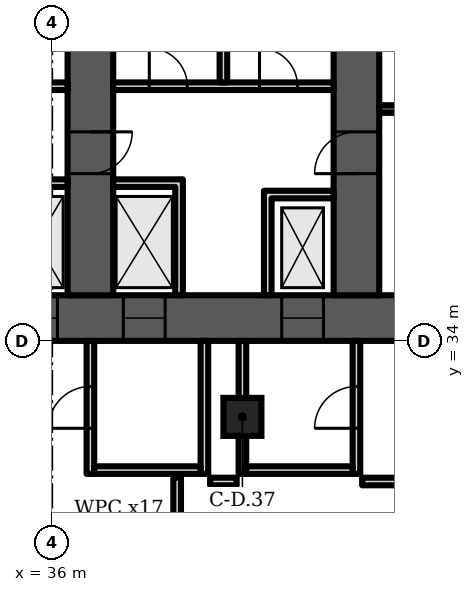
"""IFC4 building model, lengths in metres.
Left out: names, types, materials, properties, quantities, classifications, styles, units other than length and angle.
Written with IfcOpenShell. Run it as: python <this file> out.ifc"""

import sys

from ifc_helpers import new_model, si_unit, direction, frame, frame_2d, origin, origin_2d, place, context, subcontext, project, spatial, polyline, rectangle, outline, extrude, element, fill, save


model = new_model("IFC4")
c1 = context("Model", 3, precision=1e-05, world=origin(), true_north=direction((0.0, 1.0)))
c2 = subcontext(c1, "Body", "Model", "MODEL_VIEW")
j1 = project(units=[si_unit("LENGTHUNIT", "METRE"), si_unit("PLANEANGLEUNIT", "RADIAN")], contexts=[c1])
p1 = place(None, origin())
s1 = spatial("IfcSite", under=j1, at=p1, CompositionType="ELEMENT")
p2 = place(p1, origin())
s2 = spatial("IfcBuilding", under=s1, at=p2, CompositionType="ELEMENT")
p3 = place(p2, frame((0.0, 0.0, 33.0)))
s3 = spatial("IfcBuildingStorey", under=s2, at=p3, CompositionType="ELEMENT", Elevation=33.0)
p4 = place(p3, frame((41.0, 32.0, 0.0), z_axis=(0.0, 0.0, 1.0), x_axis=(1.0, 0.0, 0.0)))
e1 = element("IfcColumn", 1, at=p4, inside=s3, PredefinedType="COLUMN", context=c2, shape_type="SweptSolid", body=[
    extrude(rectangle(XDim=1.0, YDim=1.0, at=origin_2d()), origin(), (0.0, 0.0, 1.0), 8.5),
])
p5 = place(p3, frame((9.0, 34.6, 0.0), z_axis=(0.0, 0.0, 1.0), x_axis=(1.0, 0.0, 0.0)))
e2 = element("IfcWall", 2, at=p5, inside=s3, PredefinedType="SHEAR", context=c2, shape_type="SweptSolid", body=[
    extrude(rectangle(XDim=56.0, YDim=1.2, at=frame_2d((28.0, 0.0))), origin(), (0.0, 0.0, 1.0), 8.1),
])
p6 = place(p5, frame((2.0, 0.0, 0.0)))
e3 = element("IfcOpeningElement", 3, at=p6, cuts=e2, PredefinedType="OPENING", context=c2, shape_type="SweptSolid", body=[
    extrude(rectangle(XDim=1.0, YDim=2.1, at=frame_2d((0.5, 1.05))), frame((0.0, 0.61, 0.0), z_axis=(0.0, -1.0, 0.0), x_axis=(1.0, 0.0, 0.0)), (0.0, 0.0, 1.0), 1.22),
])
p7 = place(p5, frame((4.6, 0.0, 0.0)))
e4 = element("IfcOpeningElement", 4, at=p7, cuts=e2, PredefinedType="OPENING", context=c2, shape_type="SweptSolid", body=[
    extrude(rectangle(XDim=1.0, YDim=2.1, at=frame_2d((0.5, 1.05))), frame((0.0, 0.61, 0.0), z_axis=(0.0, -1.0, 0.0), x_axis=(1.0, 0.0, 0.0)), (0.0, 0.0, 1.0), 1.22),
])
p8 = place(p5, frame((7.867, 0.0, 0.0)))
e5 = element("IfcOpeningElement", 5, at=p8, cuts=e2, PredefinedType="OPENING", context=c2, shape_type="SweptSolid", body=[
    extrude(rectangle(XDim=1.1, YDim=2.1, at=frame_2d((0.55, 1.05))), frame((0.0, 0.61, 0.0), z_axis=(0.0, -1.0, 0.0), x_axis=(1.0, 0.0, 0.0)), (0.0, 0.0, 1.0), 1.22),
])
p9 = place(p5, frame((12.033, 0.0, 0.0)))
e6 = element("IfcOpeningElement", 6, at=p9, cuts=e2, PredefinedType="OPENING", context=c2, shape_type="SweptSolid", body=[
    extrude(rectangle(XDim=1.1, YDim=2.1, at=frame_2d((0.55, 1.05))), frame((0.0, 0.61, 0.0), z_axis=(0.0, -1.0, 0.0), x_axis=(1.0, 0.0, 0.0)), (0.0, 0.0, 1.0), 1.22),
])
p10 = place(p5, frame((9.8, 0.0, 0.0)))
e7 = element("IfcOpeningElement", 7, at=p10, cuts=e2, PredefinedType="OPENING", context=c2, shape_type="SweptSolid", body=[
    extrude(rectangle(XDim=1.4, YDim=2.1, at=frame_2d((0.7, 1.05))), frame((0.0, 0.61, 0.0), z_axis=(0.0, -1.0, 0.0), x_axis=(1.0, 0.0, 0.0)), (0.0, 0.0, 1.0), 1.22),
])
p11 = place(p5, frame((14.65, 0.0, 0.0)))
e8 = element("IfcOpeningElement", 8, at=p11, cuts=e2, PredefinedType="OPENING", context=c2, shape_type="SweptSolid", body=[
    extrude(rectangle(XDim=1.2, YDim=2.1, at=frame_2d((0.6, 1.05))), frame((0.0, 0.61, 0.0), z_axis=(0.0, -1.0, 0.0), x_axis=(1.0, 0.0, 0.0)), (0.0, 0.0, 1.0), 1.22),
])
p12 = place(p5, frame((21.867, 0.0, 0.0)))
e9 = element("IfcOpeningElement", 9, at=p12, cuts=e2, PredefinedType="OPENING", context=c2, shape_type="SweptSolid", body=[
    extrude(rectangle(XDim=1.1, YDim=2.1, at=frame_2d((0.55, 1.05))), frame((0.0, 0.61, 0.0), z_axis=(0.0, -1.0, 0.0), x_axis=(1.0, 0.0, 0.0)), (0.0, 0.0, 1.0), 1.22),
])
p13 = place(p5, frame((26.033, 0.0, 0.0)))
e10 = element("IfcOpeningElement", 10, at=p13, cuts=e2, PredefinedType="OPENING", context=c2, shape_type="SweptSolid", body=[
    extrude(rectangle(XDim=1.1, YDim=2.1, at=frame_2d((0.55, 1.05))), frame((0.0, 0.61, 0.0), z_axis=(0.0, -1.0, 0.0), x_axis=(1.0, 0.0, 0.0)), (0.0, 0.0, 1.0), 1.22),
])
p14 = place(p5, frame((23.8, 0.0, 0.0)))
e11 = element("IfcOpeningElement", 11, at=p14, cuts=e2, PredefinedType="OPENING", context=c2, shape_type="SweptSolid", body=[
    extrude(rectangle(XDim=1.4, YDim=2.1, at=frame_2d((0.7, 1.05))), frame((0.0, 0.61, 0.0), z_axis=(0.0, -1.0, 0.0), x_axis=(1.0, 0.0, 0.0)), (0.0, 0.0, 1.0), 1.22),
])
p15 = place(p5, frame((28.867, 0.0, 0.0)))
e12 = element("IfcOpeningElement", 12, at=p15, cuts=e2, PredefinedType="OPENING", context=c2, shape_type="SweptSolid", body=[
    extrude(rectangle(XDim=1.1, YDim=2.1, at=frame_2d((0.55, 1.05))), frame((0.0, 0.61, 0.0), z_axis=(0.0, -1.0, 0.0), x_axis=(1.0, 0.0, 0.0)), (0.0, 0.0, 1.0), 1.22),
])
p16 = place(p5, frame((33.033, 0.0, 0.0)))
e13 = element("IfcOpeningElement", 13, at=p16, cuts=e2, PredefinedType="OPENING", context=c2, shape_type="SweptSolid", body=[
    extrude(rectangle(XDim=1.1, YDim=2.1, at=frame_2d((0.55, 1.05))), frame((0.0, 0.61, 0.0), z_axis=(0.0, -1.0, 0.0), x_axis=(1.0, 0.0, 0.0)), (0.0, 0.0, 1.0), 1.22),
])
p17 = place(p5, frame((40.15, 0.0, 0.0)))
e14 = element("IfcOpeningElement", 14, at=p17, cuts=e2, PredefinedType="OPENING", context=c2, shape_type="SweptSolid", body=[
    extrude(rectangle(XDim=1.2, YDim=2.1, at=frame_2d((0.6, 1.05))), frame((0.0, 0.61, 0.0), z_axis=(0.0, -1.0, 0.0), x_axis=(1.0, 0.0, 0.0)), (0.0, 0.0, 1.0), 1.22),
])
p18 = place(p5, frame((44.8, 0.0, 0.0)))
e15 = element("IfcOpeningElement", 15, at=p18, cuts=e2, PredefinedType="OPENING", context=c2, shape_type="SweptSolid", body=[
    extrude(rectangle(XDim=1.4, YDim=2.1, at=frame_2d((0.7, 1.05))), frame((0.0, 0.61, 0.0), z_axis=(0.0, -1.0, 0.0), x_axis=(1.0, 0.0, 0.0)), (0.0, 0.0, 1.0), 1.22),
])
p19 = place(p5, frame((49.867, 0.0, 0.0)))
e16 = element("IfcOpeningElement", 16, at=p19, cuts=e2, PredefinedType="OPENING", context=c2, shape_type="SweptSolid", body=[
    extrude(rectangle(XDim=1.1, YDim=2.1, at=frame_2d((0.55, 1.05))), frame((0.0, 0.61, 0.0), z_axis=(0.0, -1.0, 0.0), x_axis=(1.0, 0.0, 0.0)), (0.0, 0.0, 1.0), 1.22),
])
p20 = place(p5, frame((53.5, 0.0, 0.0)))
e17 = element("IfcOpeningElement", 17, at=p20, cuts=e2, PredefinedType="OPENING", context=c2, shape_type="SweptSolid", body=[
    extrude(rectangle(XDim=1.1, YDim=2.1, at=frame_2d((0.55, 1.05))), frame((0.0, 0.61, 0.0), z_axis=(0.0, -1.0, 0.0), x_axis=(1.0, 0.0, 0.0)), (0.0, 0.0, 1.0), 1.22),
])
p21 = place(p5, frame((51.567, 0.0, 0.0)))
e18 = element("IfcOpeningElement", 18, at=p21, cuts=e2, PredefinedType="OPENING", context=c2, shape_type="SweptSolid", body=[
    extrude(rectangle(XDim=1.4, YDim=2.1, at=frame_2d((0.7, 1.05))), frame((0.0, 0.61, 0.0), z_axis=(0.0, -1.0, 0.0), x_axis=(1.0, 0.0, 0.0)), (0.0, 0.0, 1.0), 1.22),
])
p22 = place(p3, frame((37.0, 35.2, 0.0), z_axis=(0.0, 0.0, 1.0), x_axis=(0.0, 1.0, 0.0)))
e19 = element("IfcWall", 19, at=p22, inside=s3, PredefinedType="SHEAR", context=c2, shape_type="SweptSolid", body=[
    extrude(rectangle(XDim=12.8, YDim=1.2, at=frame_2d((6.4, 0.0))), origin(), (0.0, 0.0, 1.0), 8.1),
])
p23 = place(p22, frame((3.2, 0.0, 0.0)))
e20 = element("IfcOpeningElement", 20, at=p23, cuts=e19, PredefinedType="OPENING", context=c2, shape_type="SweptSolid", body=[
    extrude(rectangle(XDim=1.1, YDim=2.1, at=frame_2d((0.55, 1.05))), frame((0.0, 0.61, 0.0), z_axis=(0.0, -1.0, 0.0), x_axis=(1.0, 0.0, 0.0)), (0.0, 0.0, 1.0), 1.22),
])
p24 = place(p22, frame((9.6, 0.0, 0.0)))
e21 = element("IfcOpeningElement", 21, at=p24, cuts=e19, PredefinedType="OPENING", context=c2, shape_type="SweptSolid", body=[
    extrude(rectangle(XDim=1.0, YDim=2.1, at=frame_2d((0.5, 1.05))), frame((0.0, 0.61, 0.0), z_axis=(0.0, -1.0, 0.0), x_axis=(1.0, 0.0, 0.0)), (0.0, 0.0, 1.0), 1.22),
])
p25 = place(p3, frame((44.0, 35.2, 0.0), z_axis=(0.0, 0.0, 1.0), x_axis=(0.0, 1.0, 0.0)))
e22 = element("IfcWall", 22, at=p25, inside=s3, PredefinedType="SHEAR", context=c2, shape_type="SweptSolid", body=[
    extrude(rectangle(XDim=12.8, YDim=1.2, at=frame_2d((6.4, 0.0))), origin(), (0.0, 0.0, 1.0), 8.1),
])
p26 = place(p25, frame((3.2, 0.0, 0.0)))
e23 = element("IfcOpeningElement", 23, at=p26, cuts=e22, PredefinedType="OPENING", context=c2, shape_type="SweptSolid", body=[
    extrude(rectangle(XDim=1.1, YDim=2.1, at=frame_2d((0.55, 1.05))), frame((0.0, 0.61, 0.0), z_axis=(0.0, -1.0, 0.0), x_axis=(1.0, 0.0, 0.0)), (0.0, 0.0, 1.0), 1.22),
])
p27 = place(p25, frame((9.6, 0.0, 0.0)))
e24 = element("IfcOpeningElement", 24, at=p27, cuts=e22, PredefinedType="OPENING", context=c2, shape_type="SweptSolid", body=[
    extrude(rectangle(XDim=1.0, YDim=2.1, at=frame_2d((0.5, 1.05))), frame((0.0, 0.61, 0.0), z_axis=(0.0, -1.0, 0.0), x_axis=(1.0, 0.0, 0.0)), (0.0, 0.0, 1.0), 1.22),
])
p28 = place(p3, frame((30.6, 40.7, 0.0), z_axis=(0.0, 0.0, 1.0), x_axis=(1.0, 0.0, 0.0)))
e25 = element("IfcWall", 25, at=p28, inside=s3, PredefinedType="PARTITIONING", context=c2, shape_type="SweptSolid", body=[
    extrude(rectangle(XDim=5.8, YDim=0.2, at=frame_2d((2.9, 0.0))), origin(), (0.0, 0.0, 1.0), 8.1),
])
p29 = place(p28, frame((0.95, 0.0, 0.0)))
e26 = element("IfcOpeningElement", 26, at=p29, cuts=e25, PredefinedType="OPENING", context=c2, shape_type="SweptSolid", body=[
    extrude(rectangle(XDim=1.0, YDim=2.1, at=frame_2d((0.5, 1.05))), frame((0.0, 0.11, 0.0), z_axis=(0.0, -1.0, 0.0), x_axis=(1.0, 0.0, 0.0)), (0.0, 0.0, 1.0), 0.22),
])
p30 = place(p28, frame((3.85, 0.0, 0.0)))
e27 = element("IfcOpeningElement", 27, at=p30, cuts=e25, PredefinedType="OPENING", context=c2, shape_type="SweptSolid", body=[
    extrude(rectangle(XDim=1.0, YDim=2.1, at=frame_2d((0.5, 1.05))), frame((0.0, 0.11, 0.0), z_axis=(0.0, -1.0, 0.0), x_axis=(1.0, 0.0, 0.0)), (0.0, 0.0, 1.0), 0.22),
])
p31 = place(p3, origin())
e28 = element("IfcWall", 28, at=p31, inside=s3, PredefinedType="PARTITIONING", context=c2, shape_type="SweptSolid", body=[
    extrude(outline(polyline([(34.567, 38.25), (34.767, 38.25), (36.4, 38.25), (36.4, 38.05), (34.767, 38.05), (34.767, 35.2), (34.567, 35.2), (34.567, 38.25)])), origin(), (0.0, 0.0, 1.0), 8.1),
])
p32 = place(p3, frame((37.6, 40.7, 0.0), z_axis=(0.0, 0.0, 1.0), x_axis=(1.0, 0.0, 0.0)))
e29 = element("IfcWall", 29, at=p32, inside=s3, PredefinedType="PARTITIONING", context=c2, shape_type="SweptSolid", body=[
    extrude(rectangle(XDim=5.8, YDim=0.2, at=frame_2d((2.9, 0.0))), origin(), (0.0, 0.0, 1.0), 8.1),
])
p33 = place(p32, frame((0.95, 0.0, 0.0)))
e30 = element("IfcOpeningElement", 30, at=p33, cuts=e29, PredefinedType="OPENING", context=c2, shape_type="SweptSolid", body=[
    extrude(rectangle(XDim=1.0, YDim=2.1, at=frame_2d((0.5, 1.05))), frame((0.0, 0.11, 0.0), z_axis=(0.0, -1.0, 0.0), x_axis=(1.0, 0.0, 0.0)), (0.0, 0.0, 1.0), 0.22),
])
p34 = place(p32, frame((3.85, 0.0, 0.0)))
e31 = element("IfcOpeningElement", 31, at=p34, cuts=e29, PredefinedType="OPENING", context=c2, shape_type="SweptSolid", body=[
    extrude(rectangle(XDim=1.0, YDim=2.1, at=frame_2d((0.5, 1.05))), frame((0.0, 0.11, 0.0), z_axis=(0.0, -1.0, 0.0), x_axis=(1.0, 0.0, 0.0)), (0.0, 0.0, 1.0), 0.22),
])
p35 = place(p3, origin())
e32 = element("IfcWall", 32, at=p35, inside=s3, PredefinedType="PARTITIONING", context=c2, shape_type="SweptSolid", body=[
    extrude(outline(polyline([(41.567, 37.95), (41.767, 37.95), (43.4, 37.95), (43.4, 37.75), (41.767, 37.75), (41.767, 35.2), (41.567, 35.2), (41.567, 37.95)])), origin(), (0.0, 0.0, 1.0), 8.1),
])
p36 = place(p3, origin())
e33 = element("IfcWall", 33, at=p36, inside=s3, PredefinedType="PARTITIONING", context=c2, shape_type="SweptSolid", body=[
    extrude(outline(polyline([(39.233, 38.05), (37.6, 38.05), (37.6, 38.25), (39.233, 38.25), (39.433, 38.25), (39.433, 35.2), (39.233, 35.2), (39.233, 38.05)])), origin(), (0.0, 0.0, 1.0), 8.1),
])
p37 = place(p3, frame((40.5, 40.8, 0.0), z_axis=(0.0, 0.0, 1.0), x_axis=(0.0, 1.0, 0.0)))
e34 = element("IfcWall", 34, at=p37, inside=s3, PredefinedType="PARTITIONING", context=c2, shape_type="SweptSolid", body=[
    extrude(rectangle(XDim=8.653, YDim=0.2, at=frame_2d((4.326, 0.0))), origin(), (0.0, 0.0, 1.0), 8.1),
])
p38 = place(p3, frame((44.6, 40.1, 0.0), z_axis=(0.0, 0.0, 1.0), x_axis=(1.0, 0.0, 0.0)))
e35 = element("IfcWall", 35, at=p38, inside=s3, PredefinedType="SHEAR", context=c2, shape_type="SweptSolid", body=[
    extrude(rectangle(XDim=5.8, YDim=0.2, at=frame_2d((2.9, 0.0))), origin(), (0.0, 0.0, 1.0), 8.1),
])
p39 = place(p38, frame((3.325, 0.0, 0.0)))
e36 = element("IfcOpeningElement", 36, at=p39, cuts=e35, PredefinedType="OPENING", context=c2, shape_type="SweptSolid", body=[
    extrude(rectangle(XDim=1.2, YDim=2.1, at=frame_2d((0.6, 1.05))), frame((0.0, 0.11, 0.0), z_axis=(0.0, -1.0, 0.0), x_axis=(1.0, 0.0, 0.0)), (0.0, 0.0, 1.0), 0.22),
])
p40 = place(p38, frame((0.475, 0.0, 0.0)))
e37 = element("IfcOpeningElement", 37, at=p40, cuts=e35, PredefinedType="OPENING", context=c2, shape_type="SweptSolid", body=[
    extrude(rectangle(XDim=0.9, YDim=2.1, at=frame_2d((0.45, 1.05))), frame((0.0, 0.11, 0.0), z_axis=(0.0, -1.0, 0.0), x_axis=(1.0, 0.0, 0.0)), (0.0, 0.0, 1.0), 0.22),
])
p41 = place(p3, frame((37.0, 30.5, 0.0), z_axis=(0.0, 0.0, 1.0), x_axis=(0.0, 1.0, 0.0)))
e38 = element("IfcWall", 38, at=p41, inside=s3, PredefinedType="PARTITIONING", context=c2, shape_type="SweptSolid", body=[
    extrude(rectangle(XDim=3.5, YDim=0.2, at=frame_2d((1.75, 0.0))), origin(), (0.0, 0.0, 1.0), 8.1),
])
p42 = place(p41, frame((1.2, 0.0, 0.0)))
e39 = element("IfcOpeningElement", 39, at=p42, cuts=e38, PredefinedType="OPENING", context=c2, shape_type="SweptSolid", body=[
    extrude(rectangle(XDim=1.1, YDim=2.1, at=frame_2d((0.55, 1.05))), frame((0.0, 0.11, 0.0), z_axis=(0.0, -1.0, 0.0), x_axis=(1.0, 0.0, 0.0)), (0.0, 0.0, 1.0), 0.22),
])
p43 = place(p3, frame((40.0, 30.5, 0.0), z_axis=(0.0, 0.0, 1.0), x_axis=(0.0, 1.0, 0.0)))
e40 = element("IfcWall", 40, at=p43, inside=s3, PredefinedType="PARTITIONING", context=c2, shape_type="SweptSolid", body=[
    extrude(rectangle(XDim=3.5, YDim=0.2, at=frame_2d((1.75, 0.0))), origin(), (0.0, 0.0, 1.0), 8.1),
])
p44 = place(p3, frame((37.1, 30.6, 0.0), z_axis=(0.0, 0.0, 1.0), x_axis=(1.0, 0.0, 0.0)))
e41 = element("IfcWall", 41, at=p44, inside=s3, PredefinedType="PARTITIONING", context=c2, shape_type="SweptSolid", body=[
    extrude(rectangle(XDim=2.8, YDim=0.2, at=frame_2d((1.4, 0.0))), origin(), (0.0, 0.0, 1.0), 8.1),
])
p45 = place(p3, frame((41.0, 30.5, 0.0), z_axis=(0.0, 0.0, 1.0), x_axis=(0.0, 1.0, 0.0)))
e42 = element("IfcWall", 42, at=p45, inside=s3, PredefinedType="PARTITIONING", context=c2, shape_type="SweptSolid", body=[
    extrude(rectangle(XDim=3.5, YDim=0.2, at=frame_2d((1.75, 0.0))), origin(), (0.0, 0.0, 1.0), 8.1),
])
p46 = place(p3, frame((44.0, 30.5, 0.0), z_axis=(0.0, 0.0, 1.0), x_axis=(0.0, 1.0, 0.0)))
e43 = element("IfcWall", 43, at=p46, inside=s3, PredefinedType="PARTITIONING", context=c2, shape_type="SweptSolid", body=[
    extrude(rectangle(XDim=3.5, YDim=0.2, at=frame_2d((1.75, 0.0))), origin(), (0.0, 0.0, 1.0), 8.1),
])
p47 = place(p46, frame((1.2, 0.0, 0.0)))
e44 = element("IfcOpeningElement", 44, at=p47, cuts=e43, PredefinedType="OPENING", context=c2, shape_type="SweptSolid", body=[
    extrude(rectangle(XDim=1.1, YDim=2.1, at=frame_2d((0.55, 1.05))), frame((0.0, 0.11, 0.0), z_axis=(0.0, -1.0, 0.0), x_axis=(1.0, 0.0, 0.0)), (0.0, 0.0, 1.0), 0.22),
])
p48 = place(p3, frame((41.1, 30.6, 0.0), z_axis=(0.0, 0.0, 1.0), x_axis=(1.0, 0.0, 0.0)))
e45 = element("IfcWall", 45, at=p48, inside=s3, PredefinedType="PARTITIONING", context=c2, shape_type="SweptSolid", body=[
    extrude(rectangle(XDim=2.8, YDim=0.2, at=frame_2d((1.4, 0.0))), origin(), (0.0, 0.0, 1.0), 8.1),
])
p49 = place(p3, frame((39.283, 28.7, 0.0), z_axis=(0.0, 0.0, 1.0), x_axis=(0.0, 1.0, 0.0)))
e46 = element("IfcWall", 46, at=p49, inside=s3, PredefinedType="PARTITIONING", context=c2, shape_type="SweptSolid", body=[
    extrude(rectangle(XDim=1.7, YDim=0.2, at=frame_2d((0.85, 0.0))), origin(), (0.0, 0.0, 1.0), 8.1),
])
p50 = place(p3, frame((40.15, 30.3, 0.0), z_axis=(0.0, 0.0, 1.0), x_axis=(1.0, 0.0, 0.0)))
e47 = element("IfcWall", 47, at=p50, inside=s3, PredefinedType="PARTITIONING", context=c2, shape_type="SweptSolid", body=[
    extrude(rectangle(XDim=0.7, YDim=0.2, at=frame_2d((0.35, 0.0))), origin(), (0.0, 0.0, 1.0), 8.1),
])
p51 = place(p3, frame((44.15, 30.3, 0.0), z_axis=(0.0, 0.0, 1.0), x_axis=(1.0, 0.0, 0.0)))
e48 = element("IfcWall", 48, at=p51, inside=s3, PredefinedType="PARTITIONING", context=c2, shape_type="SweptSolid", body=[
    extrude(rectangle(XDim=21.53, YDim=0.2, at=frame_2d((10.765, 0.0))), origin(), (0.0, 0.0, 1.0), 8.1),
])
p52 = place(p13, origin())
e49 = element("IfcDoor", 49, at=p52, inside=s3, OperationType="DOUBLE_DOOR_SLIDING", PredefinedType="DOOR", context=c2, shape_type="SweptSolid", body=[
    extrude(rectangle(XDim=1.1, YDim=2.1, at=frame_2d((0.55, 1.05))), frame((0.0, 0.025, 0.0), z_axis=(0.0, -1.0, 0.0), x_axis=(1.0, 0.0, 0.0)), (0.0, 0.0, 1.0), 0.05),
])
fill(e10, e49)
p53 = place(p15, origin())
e50 = element("IfcDoor", 50, at=p53, inside=s3, OperationType="DOUBLE_DOOR_SLIDING", PredefinedType="DOOR", context=c2, shape_type="SweptSolid", body=[
    extrude(rectangle(XDim=1.1, YDim=2.1, at=frame_2d((0.55, 1.05))), frame((0.0, 0.025, 0.0), z_axis=(0.0, -1.0, 0.0), x_axis=(1.0, 0.0, 0.0)), (0.0, 0.0, 1.0), 0.05),
])
fill(e12, e50)
p54 = place(p16, origin())
e51 = element("IfcDoor", 51, at=p54, inside=s3, OperationType="DOUBLE_DOOR_SLIDING", PredefinedType="DOOR", context=c2, shape_type="SweptSolid", body=[
    extrude(rectangle(XDim=1.1, YDim=2.1, at=frame_2d((0.55, 1.05))), frame((0.0, 0.025, 0.0), z_axis=(0.0, -1.0, 0.0), x_axis=(1.0, 0.0, 0.0)), (0.0, 0.0, 1.0), 0.05),
])
fill(e13, e51)
p55 = place(p33, origin())
e52 = element("IfcDoor", 52, at=p55, inside=s3, OperationType="SINGLE_SWING_LEFT", PredefinedType="DOOR", context=c2, shape_type="SweptSolid", body=[
    extrude(rectangle(XDim=1.0, YDim=2.1, at=frame_2d((0.5, 1.05))), frame((0.0, 0.025, 0.0), z_axis=(0.0, -1.0, 0.0), x_axis=(1.0, 0.0, 0.0)), (0.0, 0.0, 1.0), 0.05),
])
fill(e30, e52)
p56 = place(p34, origin())
e53 = element("IfcDoor", 53, at=p56, inside=s3, OperationType="SINGLE_SWING_LEFT", PredefinedType="DOOR", context=c2, shape_type="SweptSolid", body=[
    extrude(rectangle(XDim=1.0, YDim=2.1, at=frame_2d((0.5, 1.05))), frame((0.0, 0.025, 0.0), z_axis=(0.0, -1.0, 0.0), x_axis=(1.0, 0.0, 0.0)), (0.0, 0.0, 1.0), 0.05),
])
fill(e31, e53)
p57 = place(p23, origin())
e54 = element("IfcDoor", 54, at=p57, inside=s3, OperationType="SINGLE_SWING_RIGHT", PredefinedType="DOOR", context=c2, shape_type="SweptSolid", body=[
    extrude(rectangle(XDim=1.1, YDim=2.1, at=frame_2d((0.55, 1.05))), frame((0.0, 0.025, 0.0), z_axis=(0.0, -1.0, 0.0), x_axis=(1.0, 0.0, 0.0)), (0.0, 0.0, 1.0), 0.05),
])
fill(e20, e54)
p58 = place(p26, origin())
e55 = element("IfcDoor", 55, at=p58, inside=s3, OperationType="SINGLE_SWING_LEFT", PredefinedType="DOOR", context=c2, shape_type="SweptSolid", body=[
    extrude(rectangle(XDim=1.1, YDim=2.1, at=frame_2d((0.55, 1.05))), frame((0.0, 0.025, 0.0), z_axis=(0.0, -1.0, 0.0), x_axis=(1.0, 0.0, 0.0)), (0.0, 0.0, 1.0), 0.05),
])
fill(e23, e55)
p59 = place(p42, origin())
e56 = element("IfcDoor", 56, at=p59, inside=s3, OperationType="SINGLE_SWING_LEFT", PredefinedType="DOOR", context=c2, shape_type="SweptSolid", body=[
    extrude(rectangle(XDim=1.1, YDim=2.1, at=frame_2d((0.55, 1.05))), frame((0.0, 0.025, 0.0), z_axis=(0.0, -1.0, 0.0), x_axis=(1.0, 0.0, 0.0)), (0.0, 0.0, 1.0), 0.05),
])
fill(e39, e56)
p60 = place(p47, origin())
e57 = element("IfcDoor", 57, at=p60, inside=s3, OperationType="SINGLE_SWING_LEFT", PredefinedType="DOOR", context=c2, shape_type="SweptSolid", body=[
    extrude(rectangle(XDim=1.1, YDim=2.1, at=frame_2d((0.55, 1.05))), frame((0.0, 0.025, 0.0), z_axis=(0.0, -1.0, 0.0), x_axis=(1.0, 0.0, 0.0)), (0.0, 0.0, 1.0), 0.05),
])
fill(e44, e57)
save(model, sys.argv[1])
